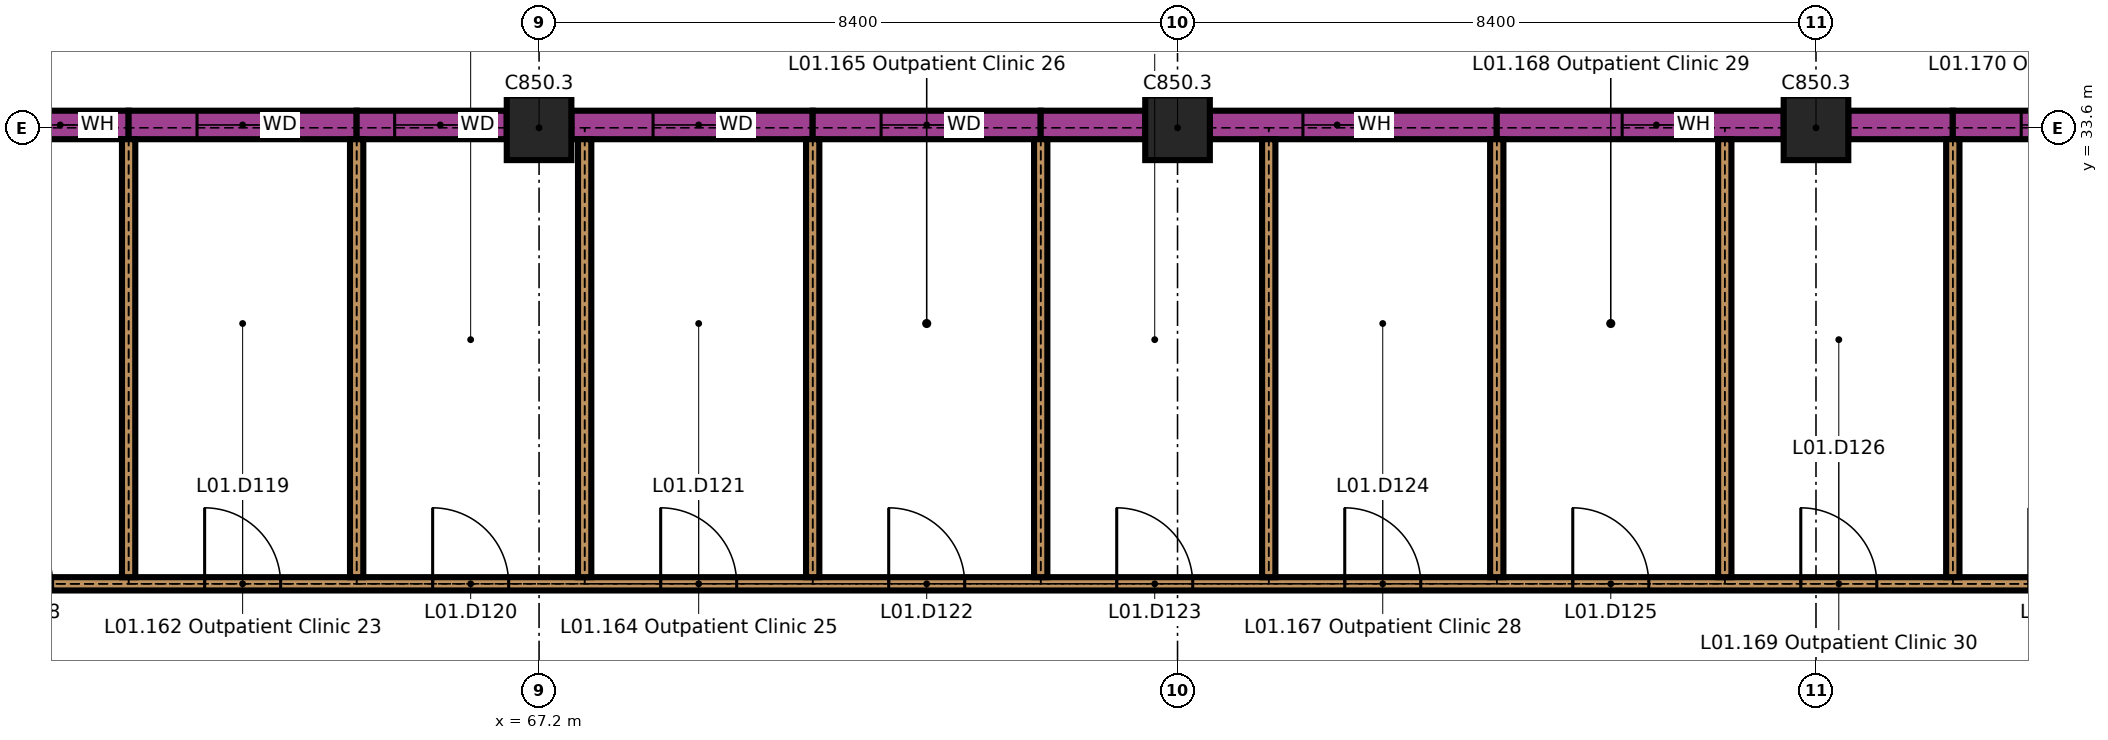
"""IFC4 building model, lengths in metres.
Left out: names, types, materials, properties, quantities, classifications, styles, units other than length and angle.
Written with IfcOpenShell. Run it as: python <this file> out.ifc"""

import sys

from ifc_helpers import new_model, si_unit, direction, frame, frame_2d, origin, origin_2d, place, context, subcontext, project, spatial, rectangle, extrude, element, fill, save


model = new_model("IFC4")
c1 = context("Model", 3, precision=1e-05, world=origin(), true_north=direction((0.0, 1.0)))
c2 = subcontext(c1, "Body", "Model", "MODEL_VIEW")
j1 = project(units=[si_unit("LENGTHUNIT", "METRE"), si_unit("PLANEANGLEUNIT", "RADIAN")], contexts=[c1])
p1 = place(None, origin())
s1 = spatial("IfcSite", under=j1, at=p1, CompositionType="ELEMENT")
p2 = place(p1, origin())
s2 = spatial("IfcBuilding", under=s1, at=p2, CompositionType="ELEMENT")
p3 = place(p2, frame((0.0, 0.0, 4.5)))
s3 = spatial("IfcBuildingStorey", under=s2, at=p3, CompositionType="ELEMENT", Elevation=4.5)
for number, where, z_axis, x_axis in (
    (1, (67.2, 33.6, 0.0), (0.0, 0.0, 1.0), (1.0, 0.0, 0.0)),
    (2, (75.6, 33.6, 0.0), (0.0, 0.0, 1.0), (1.0, 0.0, 0.0)),
    (3, (84.0, 33.6, 0.0), (0.0, 0.0, 1.0), (1.0, 0.0, 0.0)),
):
    element("IfcColumn", number, at=place(p3, frame(where, z_axis=z_axis, x_axis=x_axis)), inside=s3, PredefinedType="COLUMN", context=c2, shape_type="SweptSolid", body=[
        extrude(rectangle(XDim=0.85, YDim=0.85, at=origin_2d()), origin(), (0.0, 0.0, 1.0), 3.45),
    ])
p4 = place(p3, frame((59.225, 33.637, 0.0), z_axis=(0.0, 0.0, 1.0), x_axis=(1.0, 0.0, 0.0)))
e4 = element("IfcWall", 4, at=p4, inside=s3, PredefinedType="SOLIDWALL", context=c2, shape_type="SweptSolid", body=[
    extrude(rectangle(XDim=2.575, YDim=0.375, at=frame_2d((1.288, 0.0))), origin(), (0.0, 0.0, 1.0), 3.15),
])
p5 = place(p4, frame((1.225, 0.0, 0.9)))
e5 = element("IfcOpeningElement", 5, at=p5, cuts=e4, PredefinedType="OPENING", context=c2, shape_type="SweptSolid", body=[
    extrude(rectangle(XDim=0.9, YDim=1.5, at=frame_2d((0.45, 0.75))), frame((0.0, 0.198, 0.0), z_axis=(0.0, -1.0, 0.0), x_axis=(1.0, 0.0, 0.0)), (0.0, 0.0, 1.0), 0.395),
])
p6 = place(p3, frame((61.8, 33.637, 0.0), z_axis=(0.0, 0.0, 1.0), x_axis=(1.0, 0.0, 0.0)))
e6 = element("IfcWall", 6, at=p6, inside=s3, PredefinedType="SOLIDWALL", context=c2, shape_type="SweptSolid", body=[
    extrude(rectangle(XDim=3.0, YDim=0.375, at=frame_2d((1.5, 0.0))), origin(), (0.0, 0.0, 1.0), 3.15),
])
p7 = place(p6, frame((0.9, 0.0, 0.9)))
e7 = element("IfcOpeningElement", 7, at=p7, cuts=e6, PredefinedType="OPENING", context=c2, shape_type="SweptSolid", body=[
    extrude(rectangle(XDim=1.2, YDim=1.5, at=frame_2d((0.6, 0.75))), frame((0.0, 0.198, 0.0), z_axis=(0.0, -1.0, 0.0), x_axis=(1.0, 0.0, 0.0)), (0.0, 0.0, 1.0), 0.395),
])
p8 = place(p3, frame((64.8, 33.637, 0.0), z_axis=(0.0, 0.0, 1.0), x_axis=(1.0, 0.0, 0.0)))
e8 = element("IfcWall", 8, at=p8, inside=s3, PredefinedType="SOLIDWALL", context=c2, shape_type="SweptSolid", body=[
    extrude(rectangle(XDim=1.975, YDim=0.375, at=frame_2d((0.987, 0.0))), origin(), (0.0, 0.0, 1.0), 3.15),
])
p9 = place(p8, frame((0.5, 0.0, 0.9)))
e9 = element("IfcOpeningElement", 9, at=p9, cuts=e8, PredefinedType="OPENING", context=c2, shape_type="SweptSolid", body=[
    extrude(rectangle(XDim=1.2, YDim=1.5, at=frame_2d((0.6, 0.75))), frame((0.0, 0.198, 0.0), z_axis=(0.0, -1.0, 0.0), x_axis=(1.0, 0.0, 0.0)), (0.0, 0.0, 1.0), 0.395),
])
p10 = place(p3, frame((67.625, 33.637, 0.0), z_axis=(0.0, 0.0, 1.0), x_axis=(1.0, 0.0, 0.0)))
e10 = element("IfcWall", 10, at=p10, inside=s3, PredefinedType="SOLIDWALL", context=c2, shape_type="SweptSolid", body=[
    extrude(rectangle(XDim=3.175, YDim=0.375, at=frame_2d((1.587, 0.0))), origin(), (0.0, 0.0, 1.0), 3.15),
])
p11 = place(p10, frame((1.075, 0.0, 0.9)))
e11 = element("IfcOpeningElement", 11, at=p11, cuts=e10, PredefinedType="OPENING", context=c2, shape_type="SweptSolid", body=[
    extrude(rectangle(XDim=1.2, YDim=1.5, at=frame_2d((0.6, 0.75))), frame((0.0, 0.198, 0.0), z_axis=(0.0, -1.0, 0.0), x_axis=(1.0, 0.0, 0.0)), (0.0, 0.0, 1.0), 0.395),
])
p12 = place(p3, frame((70.8, 33.637, 0.0), z_axis=(0.0, 0.0, 1.0), x_axis=(1.0, 0.0, 0.0)))
e12 = element("IfcWall", 12, at=p12, inside=s3, PredefinedType="SOLIDWALL", context=c2, shape_type="SweptSolid", body=[
    extrude(rectangle(XDim=3.0, YDim=0.375, at=frame_2d((1.5, 0.0))), origin(), (0.0, 0.0, 1.0), 3.15),
])
p13 = place(p12, frame((0.9, 0.0, 0.9)))
e13 = element("IfcOpeningElement", 13, at=p13, cuts=e12, PredefinedType="OPENING", context=c2, shape_type="SweptSolid", body=[
    extrude(rectangle(XDim=1.2, YDim=1.5, at=frame_2d((0.6, 0.75))), frame((0.0, 0.198, 0.0), z_axis=(0.0, -1.0, 0.0), x_axis=(1.0, 0.0, 0.0)), (0.0, 0.0, 1.0), 0.395),
])
p14 = place(p3, frame((73.8, 33.637, 0.0), z_axis=(0.0, 0.0, 1.0), x_axis=(1.0, 0.0, 0.0)))
e14 = element("IfcWall", 14, at=p14, inside=s3, PredefinedType="SOLIDWALL", context=c2, shape_type="SweptSolid", body=[
    extrude(rectangle(XDim=1.375, YDim=0.375, at=frame_2d((0.688, 0.0))), origin(), (0.0, 0.0, 1.0), 3.15),
])
p15 = place(p3, frame((76.025, 33.637, 0.0), z_axis=(0.0, 0.0, 1.0), x_axis=(1.0, 0.0, 0.0)))
e15 = element("IfcWall", 15, at=p15, inside=s3, PredefinedType="SOLIDWALL", context=c2, shape_type="SweptSolid", body=[
    extrude(rectangle(XDim=3.775, YDim=0.375, at=frame_2d((1.888, 0.0))), origin(), (0.0, 0.0, 1.0), 3.15),
])
p16 = place(p15, frame((1.225, 0.0, 0.9)))
e16 = element("IfcOpeningElement", 16, at=p16, cuts=e15, PredefinedType="OPENING", context=c2, shape_type="SweptSolid", body=[
    extrude(rectangle(XDim=0.9, YDim=1.5, at=frame_2d((0.45, 0.75))), frame((0.0, 0.198, 0.0), z_axis=(0.0, -1.0, 0.0), x_axis=(1.0, 0.0, 0.0)), (0.0, 0.0, 1.0), 0.395),
])
p17 = place(p3, frame((79.8, 33.637, 0.0), z_axis=(0.0, 0.0, 1.0), x_axis=(1.0, 0.0, 0.0)))
e17 = element("IfcWall", 17, at=p17, inside=s3, PredefinedType="SOLIDWALL", context=c2, shape_type="SweptSolid", body=[
    extrude(rectangle(XDim=3.775, YDim=0.375, at=frame_2d((1.887, 0.0))), origin(), (0.0, 0.0, 1.0), 3.15),
])
p18 = place(p17, frame((1.65, 0.0, 0.9)))
e18 = element("IfcOpeningElement", 18, at=p18, cuts=e17, PredefinedType="OPENING", context=c2, shape_type="SweptSolid", body=[
    extrude(rectangle(XDim=0.9, YDim=1.5, at=frame_2d((0.45, 0.75))), frame((0.0, 0.198, 0.0), z_axis=(0.0, -1.0, 0.0), x_axis=(1.0, 0.0, 0.0)), (0.0, 0.0, 1.0), 0.395),
])
p19 = place(p3, frame((84.425, 33.637, 0.0), z_axis=(0.0, 0.0, 1.0), x_axis=(1.0, 0.0, 0.0)))
e19 = element("IfcWall", 19, at=p19, inside=s3, PredefinedType="SOLIDWALL", context=c2, shape_type="SweptSolid", body=[
    extrude(rectangle(XDim=1.375, YDim=0.375, at=frame_2d((0.688, 0.0))), origin(), (0.0, 0.0, 1.0), 3.15),
])
p20 = place(p3, frame((85.8, 33.637, 0.0), z_axis=(0.0, 0.0, 1.0), x_axis=(1.0, 0.0, 0.0)))
e20 = element("IfcWall", 20, at=p20, inside=s3, PredefinedType="SOLIDWALL", context=c2, shape_type="SweptSolid", body=[
    extrude(rectangle(XDim=3.0, YDim=0.375, at=frame_2d((1.5, 0.0))), origin(), (0.0, 0.0, 1.0), 3.15),
])
p21 = place(p20, frame((0.9, 0.0, 0.9)))
e21 = element("IfcOpeningElement", 21, at=p21, cuts=e20, PredefinedType="OPENING", context=c2, shape_type="SweptSolid", body=[
    extrude(rectangle(XDim=1.2, YDim=1.5, at=frame_2d((0.6, 0.75))), frame((0.0, 0.198, 0.0), z_axis=(0.0, -1.0, 0.0), x_axis=(1.0, 0.0, 0.0)), (0.0, 0.0, 1.0), 0.395),
])
p22 = place(p3, frame((58.8, 27.6, 0.0), z_axis=(0.0, 0.0, 1.0), x_axis=(1.0, 0.0, 0.0)))
e22 = element("IfcWall", 22, at=p22, inside=s3, PredefinedType="PARTITIONING", context=c2, shape_type="SweptSolid", body=[
    extrude(rectangle(XDim=42.0, YDim=0.175, at=frame_2d((21.0, 0.0))), origin(), (0.0, 0.0, 1.0), 3.45),
])
p23 = place(p22, frame((1.0, 0.0, 0.0)))
e23 = element("IfcOpeningElement", 23, at=p23, cuts=e22, PredefinedType="OPENING", context=c2, shape_type="SweptSolid", body=[
    extrude(rectangle(XDim=1.0, YDim=2.1, at=frame_2d((0.5, 1.05))), frame((0.0, 0.097, 0.0), z_axis=(0.0, -1.0, 0.0), x_axis=(1.0, 0.0, 0.0)), (0.0, 0.0, 1.0), 0.195),
])
p24 = place(p22, frame((4.0, 0.0, 0.0)))
e24 = element("IfcOpeningElement", 24, at=p24, cuts=e22, PredefinedType="OPENING", context=c2, shape_type="SweptSolid", body=[
    extrude(rectangle(XDim=1.0, YDim=2.1, at=frame_2d((0.5, 1.05))), frame((0.0, 0.097, 0.0), z_axis=(0.0, -1.0, 0.0), x_axis=(1.0, 0.0, 0.0)), (0.0, 0.0, 1.0), 0.195),
])
p25 = place(p22, frame((7.0, 0.0, 0.0)))
e25 = element("IfcOpeningElement", 25, at=p25, cuts=e22, PredefinedType="OPENING", context=c2, shape_type="SweptSolid", body=[
    extrude(rectangle(XDim=1.0, YDim=2.1, at=frame_2d((0.5, 1.05))), frame((0.0, 0.097, 0.0), z_axis=(0.0, -1.0, 0.0), x_axis=(1.0, 0.0, 0.0)), (0.0, 0.0, 1.0), 0.195),
])
p26 = place(p22, frame((10.0, 0.0, 0.0)))
e26 = element("IfcOpeningElement", 26, at=p26, cuts=e22, PredefinedType="OPENING", context=c2, shape_type="SweptSolid", body=[
    extrude(rectangle(XDim=1.0, YDim=2.1, at=frame_2d((0.5, 1.05))), frame((0.0, 0.097, 0.0), z_axis=(0.0, -1.0, 0.0), x_axis=(1.0, 0.0, 0.0)), (0.0, 0.0, 1.0), 0.195),
])
p27 = place(p22, frame((13.0, 0.0, 0.0)))
e27 = element("IfcOpeningElement", 27, at=p27, cuts=e22, PredefinedType="OPENING", context=c2, shape_type="SweptSolid", body=[
    extrude(rectangle(XDim=1.0, YDim=2.1, at=frame_2d((0.5, 1.05))), frame((0.0, 0.097, 0.0), z_axis=(0.0, -1.0, 0.0), x_axis=(1.0, 0.0, 0.0)), (0.0, 0.0, 1.0), 0.195),
])
p28 = place(p22, frame((16.0, 0.0, 0.0)))
e28 = element("IfcOpeningElement", 28, at=p28, cuts=e22, PredefinedType="OPENING", context=c2, shape_type="SweptSolid", body=[
    extrude(rectangle(XDim=1.0, YDim=2.1, at=frame_2d((0.5, 1.05))), frame((0.0, 0.097, 0.0), z_axis=(0.0, -1.0, 0.0), x_axis=(1.0, 0.0, 0.0)), (0.0, 0.0, 1.0), 0.195),
])
p29 = place(p22, frame((19.0, 0.0, 0.0)))
e29 = element("IfcOpeningElement", 29, at=p29, cuts=e22, PredefinedType="OPENING", context=c2, shape_type="SweptSolid", body=[
    extrude(rectangle(XDim=1.0, YDim=2.1, at=frame_2d((0.5, 1.05))), frame((0.0, 0.097, 0.0), z_axis=(0.0, -1.0, 0.0), x_axis=(1.0, 0.0, 0.0)), (0.0, 0.0, 1.0), 0.195),
])
p30 = place(p22, frame((22.0, 0.0, 0.0)))
e30 = element("IfcOpeningElement", 30, at=p30, cuts=e22, PredefinedType="OPENING", context=c2, shape_type="SweptSolid", body=[
    extrude(rectangle(XDim=1.0, YDim=2.1, at=frame_2d((0.5, 1.05))), frame((0.0, 0.097, 0.0), z_axis=(0.0, -1.0, 0.0), x_axis=(1.0, 0.0, 0.0)), (0.0, 0.0, 1.0), 0.195),
])
p31 = place(p22, frame((25.0, 0.0, 0.0)))
e31 = element("IfcOpeningElement", 31, at=p31, cuts=e22, PredefinedType="OPENING", context=c2, shape_type="SweptSolid", body=[
    extrude(rectangle(XDim=1.0, YDim=2.1, at=frame_2d((0.5, 1.05))), frame((0.0, 0.097, 0.0), z_axis=(0.0, -1.0, 0.0), x_axis=(1.0, 0.0, 0.0)), (0.0, 0.0, 1.0), 0.195),
])
p32 = place(p22, frame((28.0, 0.0, 0.0)))
e32 = element("IfcOpeningElement", 32, at=p32, cuts=e22, PredefinedType="OPENING", context=c2, shape_type="SweptSolid", body=[
    extrude(rectangle(XDim=1.0, YDim=2.1, at=frame_2d((0.5, 1.05))), frame((0.0, 0.097, 0.0), z_axis=(0.0, -1.0, 0.0), x_axis=(1.0, 0.0, 0.0)), (0.0, 0.0, 1.0), 0.195),
])
p33 = place(p22, frame((31.0, 0.0, 0.0)))
e33 = element("IfcOpeningElement", 33, at=p33, cuts=e22, PredefinedType="OPENING", context=c2, shape_type="SweptSolid", body=[
    extrude(rectangle(XDim=1.0, YDim=2.1, at=frame_2d((0.5, 1.05))), frame((0.0, 0.097, 0.0), z_axis=(0.0, -1.0, 0.0), x_axis=(1.0, 0.0, 0.0)), (0.0, 0.0, 1.0), 0.195),
])
p34 = place(p22, frame((34.0, 0.0, 0.0)))
e34 = element("IfcOpeningElement", 34, at=p34, cuts=e22, PredefinedType="OPENING", context=c2, shape_type="SweptSolid", body=[
    extrude(rectangle(XDim=1.0, YDim=2.1, at=frame_2d((0.5, 1.05))), frame((0.0, 0.097, 0.0), z_axis=(0.0, -1.0, 0.0), x_axis=(1.0, 0.0, 0.0)), (0.0, 0.0, 1.0), 0.195),
])
p35 = place(p22, frame((37.0, 0.0, 0.0)))
e35 = element("IfcOpeningElement", 35, at=p35, cuts=e22, PredefinedType="OPENING", context=c2, shape_type="SweptSolid", body=[
    extrude(rectangle(XDim=1.0, YDim=2.1, at=frame_2d((0.5, 1.05))), frame((0.0, 0.097, 0.0), z_axis=(0.0, -1.0, 0.0), x_axis=(1.0, 0.0, 0.0)), (0.0, 0.0, 1.0), 0.195),
])
p36 = place(p22, frame((40.0, 0.0, 0.0)))
e36 = element("IfcOpeningElement", 36, at=p36, cuts=e22, PredefinedType="OPENING", context=c2, shape_type="SweptSolid", body=[
    extrude(rectangle(XDim=1.0, YDim=2.1, at=frame_2d((0.5, 1.05))), frame((0.0, 0.097, 0.0), z_axis=(0.0, -1.0, 0.0), x_axis=(1.0, 0.0, 0.0)), (0.0, 0.0, 1.0), 0.195),
])
for number, where, z_axis, x_axis in (
    (37, (61.8, 27.688, 0.0), (0.0, 0.0, 1.0), (0.0, 1.0, 0.0)),
    (38, (64.8, 27.688, 0.0), (0.0, 0.0, 1.0), (0.0, 1.0, 0.0)),
    (39, (67.8, 27.688, 0.0), (0.0, 0.0, 1.0), (0.0, 1.0, 0.0)),
    (40, (70.8, 27.688, 0.0), (0.0, 0.0, 1.0), (0.0, 1.0, 0.0)),
    (41, (73.8, 27.688, 0.0), (0.0, 0.0, 1.0), (0.0, 1.0, 0.0)),
    (42, (76.8, 27.688, 0.0), (0.0, 0.0, 1.0), (0.0, 1.0, 0.0)),
    (43, (79.8, 27.688, 0.0), (0.0, 0.0, 1.0), (0.0, 1.0, 0.0)),
    (44, (82.8, 27.688, 0.0), (0.0, 0.0, 1.0), (0.0, 1.0, 0.0)),
    (45, (85.8, 27.688, 0.0), (0.0, 0.0, 1.0), (0.0, 1.0, 0.0)),
):
    element("IfcWall", number, at=place(p3, frame(where, z_axis=z_axis, x_axis=x_axis)), inside=s3, PredefinedType="PARTITIONING", context=c2, shape_type="SweptSolid", body=[
        extrude(rectangle(XDim=5.762, YDim=0.175, at=frame_2d((2.881, 0.0))), origin(), (0.0, 0.0, 1.0), 3.45),
    ])
p37 = place(p5, origin())
e46 = element("IfcWindow", 46, at=p37, inside=s3, PartitioningType="SINGLE_PANEL", PredefinedType="WINDOW", context=c2, shape_type="SweptSolid", body=[
    extrude(rectangle(XDim=0.9, YDim=1.5, at=frame_2d((0.45, 0.75))), frame((0.0, 0.03, 0.0), z_axis=(0.0, -1.0, 0.0), x_axis=(1.0, 0.0, 0.0)), (0.0, 0.0, 1.0), 0.06),
])
fill(e5, e46)
p38 = place(p7, origin())
e47 = element("IfcWindow", 47, at=p38, inside=s3, PartitioningType="SINGLE_PANEL", PredefinedType="WINDOW", context=c2, shape_type="SweptSolid", body=[
    extrude(rectangle(XDim=1.2, YDim=1.5, at=frame_2d((0.6, 0.75))), frame((0.0, 0.03, 0.0), z_axis=(0.0, -1.0, 0.0), x_axis=(1.0, 0.0, 0.0)), (0.0, 0.0, 1.0), 0.06),
])
fill(e7, e47)
p39 = place(p9, origin())
e48 = element("IfcWindow", 48, at=p39, inside=s3, PartitioningType="SINGLE_PANEL", PredefinedType="WINDOW", context=c2, shape_type="SweptSolid", body=[
    extrude(rectangle(XDim=1.2, YDim=1.5, at=frame_2d((0.6, 0.75))), frame((0.0, 0.03, 0.0), z_axis=(0.0, -1.0, 0.0), x_axis=(1.0, 0.0, 0.0)), (0.0, 0.0, 1.0), 0.06),
])
fill(e9, e48)
p40 = place(p11, origin())
e49 = element("IfcWindow", 49, at=p40, inside=s3, PartitioningType="SINGLE_PANEL", PredefinedType="WINDOW", context=c2, shape_type="SweptSolid", body=[
    extrude(rectangle(XDim=1.2, YDim=1.5, at=frame_2d((0.6, 0.75))), frame((0.0, 0.03, 0.0), z_axis=(0.0, -1.0, 0.0), x_axis=(1.0, 0.0, 0.0)), (0.0, 0.0, 1.0), 0.06),
])
fill(e11, e49)
p41 = place(p13, origin())
e50 = element("IfcWindow", 50, at=p41, inside=s3, PartitioningType="SINGLE_PANEL", PredefinedType="WINDOW", context=c2, shape_type="SweptSolid", body=[
    extrude(rectangle(XDim=1.2, YDim=1.5, at=frame_2d((0.6, 0.75))), frame((0.0, 0.03, 0.0), z_axis=(0.0, -1.0, 0.0), x_axis=(1.0, 0.0, 0.0)), (0.0, 0.0, 1.0), 0.06),
])
fill(e13, e50)
p42 = place(p16, origin())
e51 = element("IfcWindow", 51, at=p42, inside=s3, PartitioningType="SINGLE_PANEL", PredefinedType="WINDOW", context=c2, shape_type="SweptSolid", body=[
    extrude(rectangle(XDim=0.9, YDim=1.5, at=frame_2d((0.45, 0.75))), frame((0.0, 0.03, 0.0), z_axis=(0.0, -1.0, 0.0), x_axis=(1.0, 0.0, 0.0)), (0.0, 0.0, 1.0), 0.06),
])
fill(e16, e51)
p43 = place(p18, origin())
e52 = element("IfcWindow", 52, at=p43, inside=s3, PartitioningType="SINGLE_PANEL", PredefinedType="WINDOW", context=c2, shape_type="SweptSolid", body=[
    extrude(rectangle(XDim=0.9, YDim=1.5, at=frame_2d((0.45, 0.75))), frame((0.0, 0.03, 0.0), z_axis=(0.0, -1.0, 0.0), x_axis=(1.0, 0.0, 0.0)), (0.0, 0.0, 1.0), 0.06),
])
fill(e18, e52)
p44 = place(p21, origin())
e53 = element("IfcWindow", 53, at=p44, inside=s3, PartitioningType="SINGLE_PANEL", PredefinedType="WINDOW", context=c2, shape_type="SweptSolid", body=[
    extrude(rectangle(XDim=1.2, YDim=1.5, at=frame_2d((0.6, 0.75))), frame((0.0, 0.03, 0.0), z_axis=(0.0, -1.0, 0.0), x_axis=(1.0, 0.0, 0.0)), (0.0, 0.0, 1.0), 0.06),
])
fill(e21, e53)
p45 = place(p24, origin())
e54 = element("IfcDoor", 54, at=p45, inside=s3, OperationType="SINGLE_SWING_RIGHT", PredefinedType="DOOR", context=c2, shape_type="SweptSolid", body=[
    extrude(rectangle(XDim=1.0, YDim=2.1, at=frame_2d((0.5, 1.05))), frame((0.0, 0.035, 0.0), z_axis=(0.0, -1.0, 0.0), x_axis=(1.0, 0.0, 0.0)), (0.0, 0.0, 1.0), 0.07),
])
fill(e24, e54)
p46 = place(p25, origin())
e55 = element("IfcDoor", 55, at=p46, inside=s3, OperationType="SINGLE_SWING_RIGHT", PredefinedType="DOOR", context=c2, shape_type="SweptSolid", body=[
    extrude(rectangle(XDim=1.0, YDim=2.1, at=frame_2d((0.5, 1.05))), frame((0.0, 0.035, 0.0), z_axis=(0.0, -1.0, 0.0), x_axis=(1.0, 0.0, 0.0)), (0.0, 0.0, 1.0), 0.07),
])
fill(e25, e55)
p47 = place(p26, origin())
e56 = element("IfcDoor", 56, at=p47, inside=s3, OperationType="SINGLE_SWING_RIGHT", PredefinedType="DOOR", context=c2, shape_type="SweptSolid", body=[
    extrude(rectangle(XDim=1.0, YDim=2.1, at=frame_2d((0.5, 1.05))), frame((0.0, 0.035, 0.0), z_axis=(0.0, -1.0, 0.0), x_axis=(1.0, 0.0, 0.0)), (0.0, 0.0, 1.0), 0.07),
])
fill(e26, e56)
p48 = place(p27, origin())
e57 = element("IfcDoor", 57, at=p48, inside=s3, OperationType="SINGLE_SWING_RIGHT", PredefinedType="DOOR", context=c2, shape_type="SweptSolid", body=[
    extrude(rectangle(XDim=1.0, YDim=2.1, at=frame_2d((0.5, 1.05))), frame((0.0, 0.035, 0.0), z_axis=(0.0, -1.0, 0.0), x_axis=(1.0, 0.0, 0.0)), (0.0, 0.0, 1.0), 0.07),
])
fill(e27, e57)
p49 = place(p28, origin())
e58 = element("IfcDoor", 58, at=p49, inside=s3, OperationType="SINGLE_SWING_RIGHT", PredefinedType="DOOR", context=c2, shape_type="SweptSolid", body=[
    extrude(rectangle(XDim=1.0, YDim=2.1, at=frame_2d((0.5, 1.05))), frame((0.0, 0.035, 0.0), z_axis=(0.0, -1.0, 0.0), x_axis=(1.0, 0.0, 0.0)), (0.0, 0.0, 1.0), 0.07),
])
fill(e28, e58)
p50 = place(p29, origin())
e59 = element("IfcDoor", 59, at=p50, inside=s3, OperationType="SINGLE_SWING_RIGHT", PredefinedType="DOOR", context=c2, shape_type="SweptSolid", body=[
    extrude(rectangle(XDim=1.0, YDim=2.1, at=frame_2d((0.5, 1.05))), frame((0.0, 0.035, 0.0), z_axis=(0.0, -1.0, 0.0), x_axis=(1.0, 0.0, 0.0)), (0.0, 0.0, 1.0), 0.07),
])
fill(e29, e59)
p51 = place(p30, origin())
e60 = element("IfcDoor", 60, at=p51, inside=s3, OperationType="SINGLE_SWING_RIGHT", PredefinedType="DOOR", context=c2, shape_type="SweptSolid", body=[
    extrude(rectangle(XDim=1.0, YDim=2.1, at=frame_2d((0.5, 1.05))), frame((0.0, 0.035, 0.0), z_axis=(0.0, -1.0, 0.0), x_axis=(1.0, 0.0, 0.0)), (0.0, 0.0, 1.0), 0.07),
])
fill(e30, e60)
p52 = place(p31, origin())
e61 = element("IfcDoor", 61, at=p52, inside=s3, OperationType="SINGLE_SWING_RIGHT", PredefinedType="DOOR", context=c2, shape_type="SweptSolid", body=[
    extrude(rectangle(XDim=1.0, YDim=2.1, at=frame_2d((0.5, 1.05))), frame((0.0, 0.035, 0.0), z_axis=(0.0, -1.0, 0.0), x_axis=(1.0, 0.0, 0.0)), (0.0, 0.0, 1.0), 0.07),
])
fill(e31, e61)
save(model, sys.argv[1])
